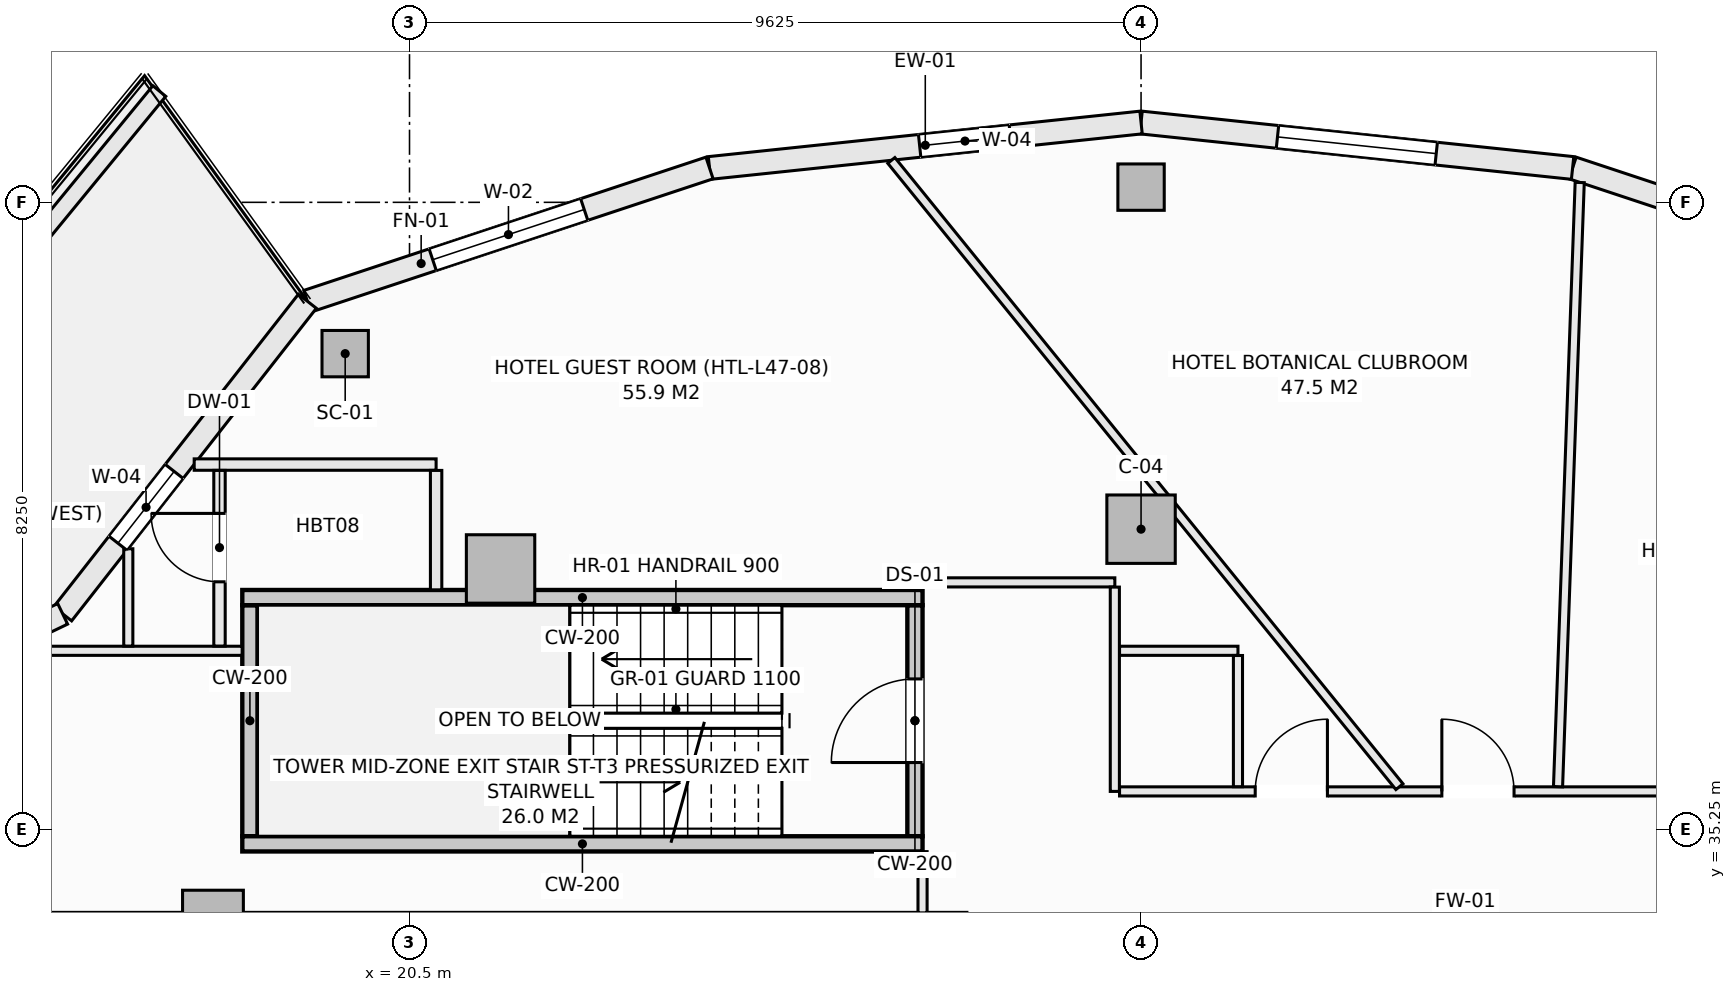
"""IFC4 building model, lengths in metres.
Left out: names, types, materials, properties, quantities, classifications, styles, units other than length and angle.
Written with IfcOpenShell. Run it as: python <this file> out.ifc"""

import sys

from ifc_helpers import new_model, si_unit, direction, frame, frame_2d, origin, origin_2d, place, context, subcontext, project, spatial, rectangle, hollow_rectangle, extrude, element, fill, save


model = new_model("IFC4")
c1 = context("Model", 3, precision=1e-05, world=origin(), true_north=direction((0.0, 1.0)))
c2 = subcontext(c1, "Body", "Model", "MODEL_VIEW")
j1 = project(units=[si_unit("LENGTHUNIT", "METRE"), si_unit("PLANEANGLEUNIT", "RADIAN")], contexts=[c1])
p1 = place(None, origin())
s1 = spatial("IfcSite", under=j1, at=p1, CompositionType="ELEMENT")
p2 = place(p1, origin())
s2 = spatial("IfcBuilding", under=s1, at=p2, CompositionType="ELEMENT")
p3 = place(p2, frame((0.0, 0.0, 180.1)))
s3 = spatial("IfcBuildingStorey", under=s2, at=p3, CompositionType="ELEMENT", Elevation=180.1)
for number, where, z_axis, x_axis in (
    (1, (30.125, 43.7, -0.27), (0.0, 0.0, 1.0), (1.0, 0.0, 0.0)),
    (2, (19.654, 41.51, -0.27), (0.0, 0.0, 1.0), (1.0, 0.0, 0.0)),
):
    element("IfcColumn", number, at=place(p3, frame(where, z_axis=z_axis, x_axis=x_axis)), inside=s3, PredefinedType="COLUMN", context=c2, shape_type="SweptSolid", body=[
        extrude(hollow_rectangle(XDim=0.61, YDim=0.61, WallThickness=0.025, at=origin_2d()), origin(), (0.0, 0.0, 1.0), 3.4),
    ])
for number, where, z_axis, x_axis in (
    (3, (30.125, 39.2, -0.27), (0.0, 0.0, 1.0), (1.0, 0.0, 0.0)),
    (4, (21.698, 38.677, -0.27), (0.0, 0.0, 1.0), (1.0, 0.0, 0.0)),
):
    element("IfcColumn", number, at=place(p3, frame(where, z_axis=z_axis, x_axis=x_axis)), inside=s3, PredefinedType="COLUMN", context=c2, shape_type="SweptSolid", body=[
        extrude(rectangle(XDim=0.9, YDim=0.9, at=origin_2d()), origin(), (0.0, 0.0, 1.0), 3.4),
    ])
p4 = place(p3, frame((17.914, 34.05, -0.27), z_axis=(0.0, 0.0, 1.0), x_axis=(1.0, 0.0, 0.0)))
e5 = element("IfcColumn", 5, at=p4, inside=s3, PredefinedType="PILASTER", context=c2, shape_type="SweptSolid", body=[
    extrude(rectangle(XDim=0.8, YDim=0.8, at=origin_2d()), origin(), (0.0, 0.0, 1.0), 3.4),
])
p5 = place(p3, frame((35.803, 43.952, 0.0), z_axis=(0.0, 0.0, 1.0), x_axis=(0.949246811547, -0.314532177636, 0.0)))
e6 = element("IfcWall", 6, at=p5, inside=s3, PredefinedType="SOLIDWALL", context=c2, shape_type="SweptSolid", body=[
    extrude(rectangle(XDim=5.574, YDim=0.3, at=frame_2d((2.787, 0.0))), origin(), (0.0, 0.0, 1.0), 2.653),
])
p6 = place(p5, frame((1.737, 0.0, 0.74)))
e7 = element("IfcOpeningElement", 7, at=p6, cuts=e6, PredefinedType="OPENING", context=c2, shape_type="SweptSolid", body=[
    extrude(rectangle(XDim=2.1, YDim=1.7, at=frame_2d((1.05, 0.85))), frame((0.0, 0.16, 0.0), z_axis=(0.0, -1.0, 0.0), x_axis=(1.0, 0.0, 0.0)), (0.0, 0.0, 1.0), 0.32),
])
p7 = place(p3, frame((30.125, 44.55, 0.0), z_axis=(0.0, 0.0, 1.0), x_axis=(0.994496545245, -0.104769372887, 0.0)))
e8 = element("IfcWall", 8, at=p7, inside=s3, PredefinedType="SOLIDWALL", context=c2, shape_type="SweptSolid", body=[
    extrude(rectangle(XDim=5.709, YDim=0.3, at=frame_2d((2.854, 0.0))), origin(), (0.0, 0.0, 1.0), 2.653),
])
p8 = place(p7, frame((1.805, 0.0, 0.74)))
e9 = element("IfcOpeningElement", 9, at=p8, cuts=e8, PredefinedType="OPENING", context=c2, shape_type="SweptSolid", body=[
    extrude(rectangle(XDim=2.1, YDim=1.7, at=frame_2d((1.05, 0.85))), frame((0.0, 0.16, 0.0), z_axis=(0.0, -1.0, 0.0), x_axis=(1.0, 0.0, 0.0)), (0.0, 0.0, 1.0), 0.32),
])
p9 = place(p3, frame((24.447, 43.952, 0.0), z_axis=(0.0, 0.0, 1.0), x_axis=(0.994496545245, 0.104769372887, 0.0)))
e10 = element("IfcWall", 10, at=p9, inside=s3, PredefinedType="SOLIDWALL", context=c2, shape_type="SweptSolid", body=[
    extrude(rectangle(XDim=5.709, YDim=0.3, at=frame_2d((2.854, 0.0))), origin(), (0.0, 0.0, 1.0), 2.653),
])
p10 = place(p9, frame((2.78, 0.0, 0.72)))
e11 = element("IfcOpeningElement", 11, at=p10, cuts=e10, PredefinedType="OPENING", context=c2, shape_type="SweptSolid", body=[
    extrude(rectangle(XDim=1.2, YDim=1.65, at=frame_2d((0.6, 0.825))), frame((0.0, 0.16, 0.0), z_axis=(0.0, -1.0, 0.0), x_axis=(1.0, 0.0, 0.0)), (0.0, 0.0, 1.0), 0.32),
])
p11 = place(p3, frame((19.156, 42.199, 0.0), z_axis=(0.0, 0.0, 1.0), x_axis=(0.949246811547, 0.314532177636, 0.0)))
e12 = element("IfcWall", 12, at=p11, inside=s3, PredefinedType="SOLIDWALL", context=c2, shape_type="SweptSolid", body=[
    extrude(rectangle(XDim=5.574, YDim=0.3, at=frame_2d((2.787, 0.0))), origin(), (0.0, 0.0, 1.0), 2.653),
])
p12 = place(p11, frame((1.737, 0.0, 0.74)))
e13 = element("IfcOpeningElement", 13, at=p12, cuts=e12, PredefinedType="OPENING", context=c2, shape_type="SweptSolid", body=[
    extrude(rectangle(XDim=2.1, YDim=1.7, at=frame_2d((1.05, 0.85))), frame((0.0, 0.16, 0.0), z_axis=(0.0, -1.0, 0.0), x_axis=(1.0, 0.0, 0.0)), (0.0, 0.0, 1.0), 0.32),
])
p13 = place(p3, frame((15.937, 38.086, 0.0), z_axis=(0.0, 0.0, 1.0), x_axis=(0.616429245738, 0.787410302828, 0.0)))
e14 = element("IfcWall", 14, at=p13, inside=s3, PredefinedType="SOLIDWALL", context=c2, shape_type="SweptSolid", body=[
    extrude(rectangle(XDim=5.223, YDim=0.3, at=frame_2d((2.612, 0.0))), origin(), (0.0, 0.0, 1.0), 2.653),
])
p14 = place(p13, frame((1.18, 0.0, 0.72)))
e15 = element("IfcOpeningElement", 15, at=p14, cuts=e14, PredefinedType="OPENING", context=c2, shape_type="SweptSolid", body=[
    extrude(rectangle(XDim=1.2, YDim=1.65, at=frame_2d((0.6, 0.825))), frame((0.0, 0.16, 0.0), z_axis=(0.0, -1.0, 0.0), x_axis=(1.0, 0.0, 0.0)), (0.0, 0.0, 1.0), 0.32),
])
p15 = place(p3, frame((11.127, 35.775, 0.0), z_axis=(0.0, 0.0, 1.0), x_axis=(0.901353070301, 0.433085029363, 0.0)))
e16 = element("IfcWall", 16, at=p15, inside=s3, PredefinedType="SOLIDWALL", context=c2, shape_type="SweptSolid", body=[
    extrude(rectangle(XDim=5.336, YDim=0.3, at=frame_2d((2.668, 0.0))), origin(), (0.0, 0.0, 1.0), 2.653),
])
p16 = place(p15, frame((1.768, 0.0, 0.0)))
e17 = element("IfcOpeningElement", 17, at=p16, cuts=e16, PredefinedType="OPENING", context=c2, shape_type="SweptSolid", body=[
    extrude(rectangle(XDim=1.8, YDim=2.25, at=frame_2d((0.9, 1.125))), frame((0.0, 0.16, 0.0), z_axis=(0.0, -1.0, 0.0), x_axis=(1.0, 0.0, 0.0)), (0.0, 0.0, 1.0), 0.32),
])
p17 = place(p3, frame((13.246, 40.137, 0.0), z_axis=(0.0, 0.0, 1.0), x_axis=(0.634429234628, 0.77298094818, 0.0)))
e18 = element("IfcWall", 18, at=p17, inside=s3, PredefinedType="PARAPET", context=c2, shape_type="SweptSolid", body=[
    extrude(rectangle(XDim=6.245, YDim=0.22, at=frame_2d((3.123, 0.0))), origin(), (0.0, 0.0, 1.0), 0.52),
])
p18 = place(p3, frame((27.15, 35.16, -0.27), z_axis=(0.0, 0.0, 1.0), x_axis=(0.0, 1.0, 0.0)))
e19 = element("IfcWall", 19, at=p18, inside=s3, PredefinedType="SHEAR", context=c2, shape_type="SweptSolid", body=[
    extrude(rectangle(XDim=3.04, YDim=0.2, at=frame_2d((1.52, 0.0))), origin(), (0.0, 0.0, 1.0), 3.4),
])
p19 = place(p18, frame((0.97, 0.0, 0.27)))
e20 = element("IfcOpeningElement", 20, at=p19, cuts=e19, PredefinedType="OPENING", context=c2, shape_type="SweptSolid", body=[
    extrude(rectangle(XDim=1.1, YDim=2.15, at=frame_2d((0.55, 1.075))), frame((0.0, 0.11, 0.0), z_axis=(0.0, -1.0, 0.0), x_axis=(1.0, 0.0, 0.0)), (0.0, 0.0, 1.0), 0.22),
])
p20 = place(p3, frame((18.4, 35.16, -0.27), z_axis=(0.0, 0.0, 1.0), x_axis=(0.0, 1.0, 0.0)))
e21 = element("IfcWall", 21, at=p20, inside=s3, PredefinedType="SHEAR", context=c2, shape_type="SweptSolid", body=[
    extrude(rectangle(XDim=3.04, YDim=0.2, at=frame_2d((1.52, 0.0))), origin(), (0.0, 0.0, 1.0), 3.4),
])
for number, where, z_axis, x_axis in (
    (22, (18.3, 38.3, -0.27), (0.0, 0.0, 1.0), (1.0, 0.0, 0.0)),
    (23, (18.3, 35.06, -0.27), (0.0, 0.0, 1.0), (1.0, 0.0, 0.0)),
):
    element("IfcWall", number, at=place(p3, frame(where, z_axis=z_axis, x_axis=x_axis)), inside=s3, PredefinedType="SHEAR", context=c2, shape_type="SweptSolid", body=[
        extrude(rectangle(XDim=8.95, YDim=0.2, at=frame_2d((4.475, 0.0))), origin(), (0.0, 0.0, 1.0), 3.4),
    ])
p21 = place(p3, frame((27.25, 34.152, 0.0), z_axis=(0.0, 0.0, 1.0), x_axis=(0.0, 1.0, 0.0)))
e24 = element("IfcWall", 24, at=p21, inside=s3, PredefinedType="PARTITIONING", context=c2, shape_type="SweptSolid", body=[
    extrude(rectangle(XDim=0.806, YDim=0.12, at=frame_2d((0.403, 0.0))), origin(), (0.0, 0.0, 1.0), 3.13),
])
p22 = place(p3, frame((27.25, 38.5, 0.0), z_axis=(0.0, 0.0, 1.0), x_axis=(1.0, 0.0, 0.0)))
e25 = element("IfcWall", 25, at=p22, inside=s3, PredefinedType="PARTITIONING", context=c2, shape_type="SweptSolid", body=[
    extrude(rectangle(XDim=2.53, YDim=0.12, at=frame_2d((1.265, 0.0))), origin(), (0.0, 0.0, 1.0), 3.13),
])
p23 = place(p3, frame((29.78, 35.75, 0.0), z_axis=(0.0, 0.0, 1.0), x_axis=(0.0, 1.0, 0.0)))
e26 = element("IfcWall", 26, at=p23, inside=s3, PredefinedType="PARTITIONING", context=c2, shape_type="SweptSolid", body=[
    extrude(rectangle(XDim=2.688, YDim=0.12, at=frame_2d((1.344, 0.0))), origin(), (0.0, 0.0, 1.0), 3.13),
])
p24 = place(p3, frame((29.842, 35.75, 0.0), z_axis=(0.0, 0.0, 1.0), x_axis=(1.0, 0.0, 0.0)))
e27 = element("IfcWall", 27, at=p24, inside=s3, PredefinedType="PARTITIONING", context=c2, shape_type="SweptSolid", body=[
    extrude(rectangle(XDim=9.116, YDim=0.12, at=frame_2d((4.558, 0.0))), origin(), (0.0, 0.0, 1.0), 2.505),
])
p25 = place(p24, frame((4.24, 0.0, 0.0)))
e28 = element("IfcOpeningElement", 28, at=p25, cuts=e27, PredefinedType="OPENING", context=c2, shape_type="SweptSolid", body=[
    extrude(rectangle(XDim=0.95, YDim=2.1, at=frame_2d((0.475, 1.05))), frame((0.0, 0.07, 0.0), z_axis=(0.0, -1.0, 0.0), x_axis=(1.0, 0.0, 0.0)), (0.0, 0.0, 1.0), 0.14),
])
p26 = place(p24, frame((1.785, 0.0, 0.0)))
e29 = element("IfcOpeningElement", 29, at=p26, cuts=e27, PredefinedType="OPENING", context=c2, shape_type="SweptSolid", body=[
    extrude(rectangle(XDim=0.95, YDim=2.1, at=frame_2d((0.475, 1.05))), frame((0.0, 0.07, 0.0), z_axis=(0.0, -1.0, 0.0), x_axis=(1.0, 0.0, 0.0)), (0.0, 0.0, 1.0), 0.14),
])
p27 = place(p3, frame((15.276, 37.6, 0.0), z_axis=(0.0, 0.0, 1.0), x_axis=(1.0, 0.0, 0.0)))
e30 = element("IfcWall", 30, at=p27, inside=s3, PredefinedType="PARTITIONING", context=c2, shape_type="SweptSolid", body=[
    extrude(rectangle(XDim=3.022, YDim=0.12, at=frame_2d((1.511, 0.0))), origin(), (0.0, 0.0, 1.0), 3.13),
])
p28 = place(p3, frame((29.842, 37.6, 0.0), z_axis=(0.0, 0.0, 1.0), x_axis=(1.0, 0.0, 0.0)))
e31 = element("IfcWall", 31, at=p28, inside=s3, PredefinedType="PARTITIONING", context=c2, shape_type="SweptSolid", body=[
    extrude(rectangle(XDim=1.558, YDim=0.12, at=frame_2d((0.779, 0.0))), origin(), (0.0, 0.0, 1.0), 3.13),
])
p29 = place(p3, frame((31.4, 35.812, 0.0), z_axis=(0.0, 0.0, 1.0), x_axis=(0.0, 1.0, 0.0)))
e32 = element("IfcWall", 32, at=p29, inside=s3, PredefinedType="PARTITIONING", context=c2, shape_type="SweptSolid", body=[
    extrude(rectangle(XDim=1.726, YDim=0.12, at=frame_2d((0.863, 0.0))), origin(), (0.0, 0.0, 1.0), 3.13),
])
p30 = place(p3, frame((17.667, 40.05, 0.0), z_axis=(0.0, 0.0, 1.0), x_axis=(1.0, 0.0, 0.0)))
e33 = element("IfcWall", 33, at=p30, inside=s3, PredefinedType="PARTITIONING", context=c2, shape_type="SweptSolid", body=[
    extrude(rectangle(XDim=3.183, YDim=0.15, at=frame_2d((1.592, 0.0))), origin(), (0.0, 0.0, 1.0), 2.653),
])
p31 = place(p3, frame((35.611, 35.812, 0.0), z_axis=(0.0, 0.0, 1.0), x_axis=(0.035850277254, 0.999357172197, 0.0)))
e34 = element("IfcWall", 34, at=p31, inside=s3, PredefinedType="PARTITIONING", context=c2, shape_type="SweptSolid", body=[
    extrude(rectangle(XDim=7.954, YDim=0.12, at=frame_2d((3.977, 0.0))), origin(), (0.0, 0.0, 1.0), 3.13),
])
p32 = place(p3, frame((26.839, 44.051, 0.0), z_axis=(0.0, 0.0, 1.0), x_axis=(0.630087458982, -0.77652417479, 0.0)))
e35 = element("IfcWall", 35, at=p32, inside=s3, PredefinedType="PARTITIONING", context=c2, shape_type="SweptSolid", body=[
    extrude(rectangle(XDim=10.61, YDim=0.12, at=frame_2d((5.305, 0.0))), origin(), (0.0, 0.0, 1.0), 2.505),
])
p33 = place(p3, frame((20.85, 38.402, 0.0), z_axis=(0.0, 0.0, 1.0), x_axis=(0.0, 1.0, 0.0)))
e36 = element("IfcWall", 36, at=p33, inside=s3, PredefinedType="PARTITIONING", context=c2, shape_type="SweptSolid", body=[
    extrude(rectangle(XDim=1.571, YDim=0.15, at=frame_2d((0.785, 0.0))), origin(), (0.0, 0.0, 1.0), 2.505),
])
p34 = place(p3, frame((18.0, 37.662, 0.0), z_axis=(0.0, 0.0, 1.0), x_axis=(0.0, 1.0, 0.0)))
e37 = element("IfcWall", 37, at=p34, inside=s3, PredefinedType="PARTITIONING", context=c2, shape_type="SweptSolid", body=[
    extrude(rectangle(XDim=2.311, YDim=0.15, at=frame_2d((1.155, 0.0))), origin(), (0.0, 0.0, 1.0), 3.13),
])
p35 = place(p34, frame((0.845, 0.0, 0.0)))
e38 = element("IfcOpeningElement", 38, at=p35, cuts=e37, PredefinedType="OPENING", context=c2, shape_type="SweptSolid", body=[
    extrude(rectangle(XDim=0.9, YDim=2.1, at=frame_2d((0.45, 1.05))), frame((0.0, 0.085, 0.0), z_axis=(0.0, -1.0, 0.0), x_axis=(1.0, 0.0, 0.0)), (0.0, 0.0, 1.0), 0.17),
])
p36 = place(p3, frame((16.8, 37.662, 0.0), z_axis=(0.0, 0.0, 1.0), x_axis=(0.0, 1.0, 0.0)))
e39 = element("IfcWall", 39, at=p36, inside=s3, PredefinedType="PARTITIONING", context=c2, shape_type="SweptSolid", body=[
    extrude(rectangle(XDim=1.28, YDim=0.12, at=frame_2d((0.64, 0.0))), origin(), (0.0, 0.0, 1.0), 3.13),
])
p37 = place(p8, origin())
e40 = element("IfcWindow", 40, at=p37, inside=s3, PartitioningType="SINGLE_PANEL", PredefinedType="WINDOW", context=c2, shape_type="SweptSolid", body=[
    extrude(rectangle(XDim=2.1, YDim=1.7, at=frame_2d((1.05, 0.85))), frame((0.0, 0.03, 0.0), z_axis=(0.0, -1.0, 0.0), x_axis=(1.0, 0.0, 0.0)), (0.0, 0.0, 1.0), 0.06),
])
fill(e9, e40)
p38 = place(p10, origin())
e41 = element("IfcWindow", 41, at=p38, inside=s3, PartitioningType="SINGLE_PANEL", PredefinedType="WINDOW", context=c2, shape_type="SweptSolid", body=[
    extrude(rectangle(XDim=1.2, YDim=1.65, at=frame_2d((0.6, 0.825))), frame((0.0, 0.03, 0.0), z_axis=(0.0, -1.0, 0.0), x_axis=(1.0, 0.0, 0.0)), (0.0, 0.0, 1.0), 0.06),
])
fill(e11, e41)
p39 = place(p12, origin())
e42 = element("IfcWindow", 42, at=p39, inside=s3, PartitioningType="SINGLE_PANEL", PredefinedType="WINDOW", context=c2, shape_type="SweptSolid", body=[
    extrude(rectangle(XDim=2.1, YDim=1.7, at=frame_2d((1.05, 0.85))), frame((0.0, 0.03, 0.0), z_axis=(0.0, -1.0, 0.0), x_axis=(1.0, 0.0, 0.0)), (0.0, 0.0, 1.0), 0.06),
])
fill(e13, e42)
p40 = place(p14, origin())
e43 = element("IfcWindow", 43, at=p40, inside=s3, PartitioningType="SINGLE_PANEL", PredefinedType="WINDOW", context=c2, shape_type="SweptSolid", body=[
    extrude(rectangle(XDim=1.2, YDim=1.65, at=frame_2d((0.6, 0.825))), frame((0.0, 0.03, 0.0), z_axis=(0.0, -1.0, 0.0), x_axis=(1.0, 0.0, 0.0)), (0.0, 0.0, 1.0), 0.06),
])
fill(e15, e43)
p41 = place(p19, origin())
e44 = element("IfcDoor", 44, at=p41, inside=s3, OperationType="SINGLE_SWING_LEFT", PredefinedType="DOOR", context=c2, shape_type="SweptSolid", body=[
    extrude(rectangle(XDim=1.1, YDim=2.15, at=frame_2d((0.55, 1.075))), frame((0.0, 0.025, 0.0), z_axis=(0.0, -1.0, 0.0), x_axis=(1.0, 0.0, 0.0)), (0.0, 0.0, 1.0), 0.05),
])
fill(e20, e44)
p42 = place(p25, origin())
e45 = element("IfcDoor", 45, at=p42, inside=s3, OperationType="SINGLE_SWING_LEFT", PredefinedType="DOOR", context=c2, shape_type="SweptSolid", body=[
    extrude(rectangle(XDim=0.95, YDim=2.1, at=frame_2d((0.475, 1.05))), frame((0.0, 0.025, 0.0), z_axis=(0.0, -1.0, 0.0), x_axis=(1.0, 0.0, 0.0)), (0.0, 0.0, 1.0), 0.05),
])
fill(e28, e45)
p43 = place(p26, origin())
e46 = element("IfcDoor", 46, at=p43, inside=s3, OperationType="SINGLE_SWING_RIGHT", PredefinedType="DOOR", context=c2, shape_type="SweptSolid", body=[
    extrude(rectangle(XDim=0.95, YDim=2.1, at=frame_2d((0.475, 1.05))), frame((0.0, 0.025, 0.0), z_axis=(0.0, -1.0, 0.0), x_axis=(1.0, 0.0, 0.0)), (0.0, 0.0, 1.0), 0.05),
])
fill(e29, e46)
p44 = place(p35, origin())
e47 = element("IfcDoor", 47, at=p44, inside=s3, OperationType="SINGLE_SWING_RIGHT", PredefinedType="DOOR", context=c2, shape_type="SweptSolid", body=[
    extrude(rectangle(XDim=0.9, YDim=2.1, at=frame_2d((0.45, 1.05))), frame((0.0, 0.025, 0.0), z_axis=(0.0, -1.0, 0.0), x_axis=(1.0, 0.0, 0.0)), (0.0, 0.0, 1.0), 0.05),
])
fill(e38, e47)
save(model, sys.argv[1])
